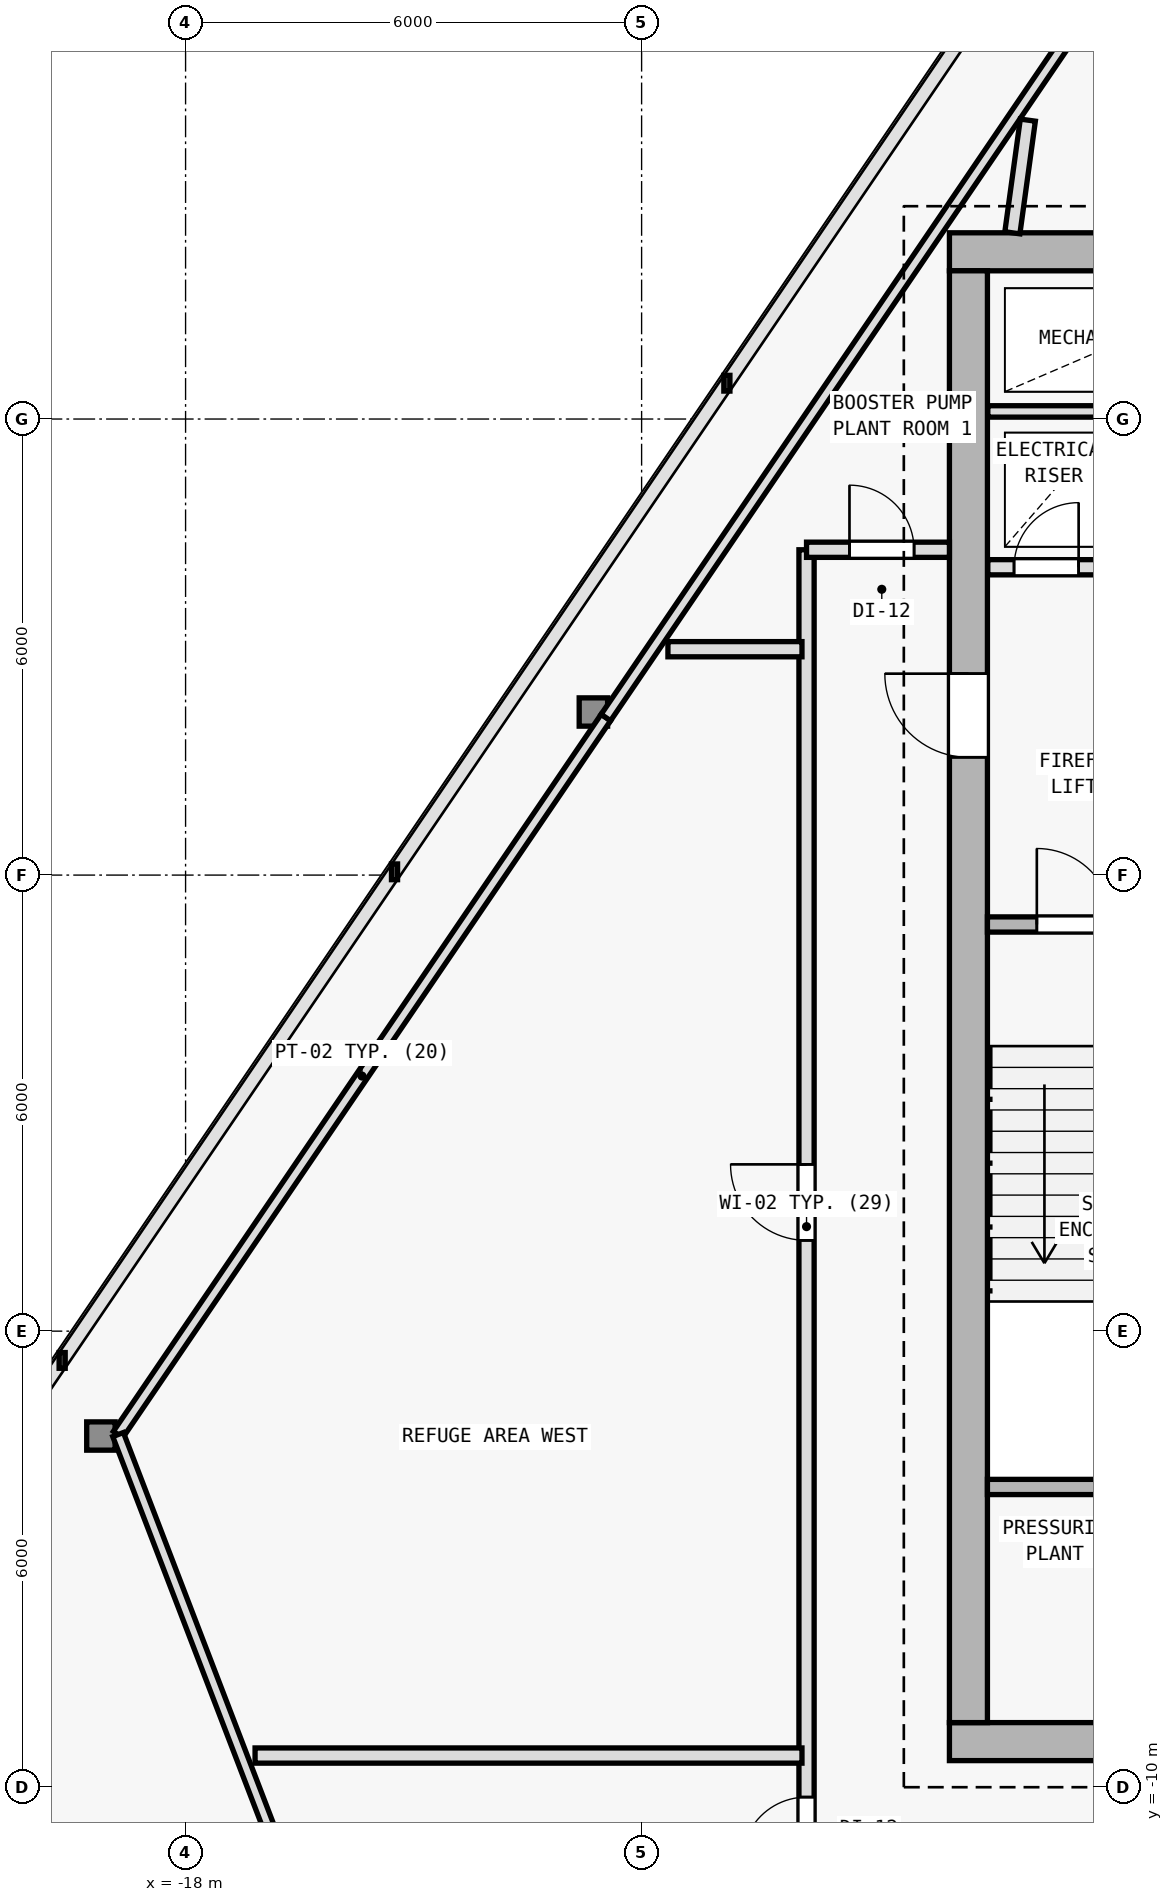
"""IFC4 building model, lengths in metres.
Left out: names, types, materials, properties, quantities, classifications, styles, units other than length and angle.
Written with IfcOpenShell. Run it as: python <this file> out.ifc"""

import sys

from ifc_helpers import new_model, si_unit, direction, frame, frame_2d, origin, origin_2d, place, context, subcontext, project, spatial, rectangle, i_section, extrude, element, fill, save


model = new_model("IFC4")
c1 = context("Model", 3, precision=1e-05, world=origin(), true_north=direction((0.0, 1.0)))
c2 = subcontext(c1, "Body", "Model", "MODEL_VIEW")
j1 = project(units=[si_unit("LENGTHUNIT", "METRE"), si_unit("PLANEANGLEUNIT", "RADIAN")], contexts=[c1])
p1 = place(None, origin())
s1 = spatial("IfcSite", under=j1, at=p1, CompositionType="ELEMENT")
p2 = place(p1, origin())
s2 = spatial("IfcBuilding", under=s1, at=p2, CompositionType="ELEMENT")
p3 = place(p2, frame((0.0, 0.0, 241.5)))
s3 = spatial("IfcBuildingStorey", under=s2, at=p3, CompositionType="ELEMENT", Elevation=241.5)
for number, where, z_axis, x_axis in (
    (1, (-7.7, -9.4, 0.0), (0.0, 0.0, 1.0), (1.0, 0.0, 0.0)),
    (2, (-7.7, 10.2, 0.0), (0.0, 0.0, 1.0), (1.0, 0.0, 0.0)),
    (3, (-7.7, 2.0, 0.0), (0.0, 0.0, 1.0), (1.0, 0.0, 0.0)),
):
    element("IfcColumn", number, at=place(p3, frame(where, z_axis=z_axis, x_axis=x_axis)), inside=s3, PredefinedType="COLUMN", context=c2, shape_type="SweptSolid", body=[
        extrude(i_section(OverallWidth=0.398, OverallDepth=0.387, WebThickness=0.013, FlangeThickness=0.022, FilletRadius=0.015, at=origin_2d()), origin(), (0.0, 0.0, 1.0), 4.8),
    ])
p4 = place(p3, frame((-12.634, 4.146, 0.006), z_axis=(0.013151707095, 0.007340487681, 0.999886568487), x_axis=(-0.487366159264, 0.873197702015, 0.0)))
e4 = element("IfcColumn", 4, at=p4, inside=s3, PredefinedType="COLUMN", context=c2, shape_type="SweptSolid", body=[
    extrude(i_section(OverallWidth=0.374, OverallDepth=0.372, WebThickness=0.012, FlangeThickness=0.02, FilletRadius=0.015, at=origin_2d()), origin(), (0.0, 0.0, 1.0), 4.789),
])
p5 = place(p3, frame((-19.114, -5.38, 0.006), z_axis=(0.019468495457, 0.016665439828, 0.999671566466), x_axis=(-0.65029991508, 0.759677576638, 0.0)))
e5 = element("IfcColumn", 5, at=p5, inside=s3, PredefinedType="COLUMN", context=c2, shape_type="SweptSolid", body=[
    extrude(i_section(OverallWidth=0.374, OverallDepth=0.372, WebThickness=0.012, FlangeThickness=0.02, FilletRadius=0.015, at=origin_2d()), origin(), (0.0, 0.0, 1.0), 4.79),
])
p6 = place(p3, frame((-7.95, -9.4, 0.0), z_axis=(0.0, 0.0, 1.0), x_axis=(1.0, 0.0, 0.0)))
e6 = element("IfcWall", 6, at=p6, inside=s3, PredefinedType="SHEAR", context=c2, shape_type="SweptSolid", body=[
    extrude(rectangle(XDim=15.9, YDim=0.5, at=frame_2d((7.95, 0.0))), origin(), (0.0, 0.0, 1.0), 4.5),
])
p7 = place(p6, frame((9.6, 0.0, 0.0)))
e7 = element("IfcOpeningElement", 7, at=p7, cuts=e6, PredefinedType="OPENING", context=c2, shape_type="SweptSolid", body=[
    extrude(rectangle(XDim=1.5, YDim=2.2, at=frame_2d((0.75, 1.1))), frame((0.0, 0.26, 0.0), z_axis=(0.0, -1.0, 0.0), x_axis=(1.0, 0.0, 0.0)), (0.0, 0.0, 1.0), 0.52),
])
p8 = place(p3, frame((7.95, 10.2, 0.0), z_axis=(0.0, 0.0, 1.0), x_axis=(-1.0, 0.0, 0.0)))
e8 = element("IfcWall", 8, at=p8, inside=s3, PredefinedType="SHEAR", context=c2, shape_type="SweptSolid", body=[
    extrude(rectangle(XDim=15.9, YDim=0.5, at=frame_2d((7.95, 0.0))), origin(), (0.0, 0.0, 1.0), 4.5),
])
p9 = place(p3, frame((-7.7, -9.15, 0.0), z_axis=(0.0, 0.0, 1.0), x_axis=(0.0, 1.0, 0.0)))
e9 = element("IfcWall", 9, at=p9, inside=s3, PredefinedType="SHEAR", context=c2, shape_type="SweptSolid", body=[
    extrude(rectangle(XDim=19.1, YDim=0.5, at=frame_2d((9.55, 0.0))), origin(), (0.0, 0.0, 1.0), 4.5),
])
p10 = place(p9, frame((12.7, 0.0, 0.0)))
e10 = element("IfcOpeningElement", 10, at=p10, cuts=e9, PredefinedType="OPENING", context=c2, shape_type="SweptSolid", body=[
    extrude(rectangle(XDim=1.1, YDim=2.15, at=frame_2d((0.55, 1.075))), frame((0.0, 0.26, 0.0), z_axis=(0.0, -1.0, 0.0), x_axis=(1.0, 0.0, 0.0)), (0.0, 0.0, 1.0), 0.52),
])
p11 = place(p3, frame((-7.45, 1.35, 0.0), z_axis=(0.0, 0.0, 1.0), x_axis=(1.0, 0.0, 0.0)))
e11 = element("IfcWall", 11, at=p11, inside=s3, PredefinedType="SOLIDWALL", context=c2, shape_type="SweptSolid", body=[
    extrude(rectangle(XDim=3.4, YDim=0.2, at=frame_2d((1.7, 0.0))), origin(), (0.0, 0.0, 1.0), 4.5),
])
p12 = place(p11, frame((0.65, 0.0, 0.0)))
e12 = element("IfcOpeningElement", 12, at=p12, cuts=e11, PredefinedType="OPENING", context=c2, shape_type="SweptSolid", body=[
    extrude(rectangle(XDim=1.0, YDim=2.15, at=frame_2d((0.5, 1.075))), frame((0.0, 0.11, 0.0), z_axis=(0.0, -1.0, 0.0), x_axis=(1.0, 0.0, 0.0)), (0.0, 0.0, 1.0), 0.22),
])
p13 = place(p3, frame((-7.445, 6.05, 0.0), z_axis=(0.0, 0.0, 1.0), x_axis=(1.0, 0.0, 0.0)))
e13 = element("IfcWall", 13, at=p13, inside=s3, PredefinedType="SOLIDWALL", context=c2, shape_type="SweptSolid", body=[
    extrude(rectangle(XDim=3.595, YDim=0.2, at=frame_2d((1.797, 0.0))), origin(), (0.0, 0.0, 1.0), 4.5),
])
p14 = place(p13, frame((0.345, 0.0, 0.0)))
e14 = element("IfcOpeningElement", 14, at=p14, cuts=e13, PredefinedType="OPENING", context=c2, shape_type="SweptSolid", body=[
    extrude(rectangle(XDim=0.85, YDim=2.1, at=frame_2d((0.425, 1.05))), frame((0.0, 0.11, 0.0), z_axis=(0.0, -1.0, 0.0), x_axis=(1.0, 0.0, 0.0)), (0.0, 0.0, 1.0), 0.22),
])
p15 = place(p13, frame((2.145, 0.0, 0.0)))
e15 = element("IfcOpeningElement", 15, at=p15, cuts=e13, PredefinedType="OPENING", context=c2, shape_type="SweptSolid", body=[
    extrude(rectangle(XDim=0.85, YDim=2.1, at=frame_2d((0.425, 1.05))), frame((0.0, 0.11, 0.0), z_axis=(0.0, -1.0, 0.0), x_axis=(1.0, 0.0, 0.0)), (0.0, 0.0, 1.0), 0.22),
])
p16 = place(p3, frame((-7.445, 8.1, 0.0), z_axis=(0.0, 0.0, 1.0), x_axis=(1.0, 0.0, 0.0)))
e16 = element("IfcWall", 16, at=p16, inside=s3, PredefinedType="PARTITIONING", context=c2, shape_type="SweptSolid", body=[
    extrude(rectangle(XDim=3.595, YDim=0.15, at=frame_2d((1.797, 0.0))), origin(), (0.0, 0.0, 1.0), 4.5),
])
p17 = place(p3, frame((-7.45, -6.05, 0.0), z_axis=(0.0, 0.0, 1.0), x_axis=(1.0, 0.0, 0.0)))
e17 = element("IfcWall", 17, at=p17, inside=s3, PredefinedType="SOLIDWALL", context=c2, shape_type="SweptSolid", body=[
    extrude(rectangle(XDim=3.4, YDim=0.2, at=frame_2d((1.7, 0.0))), origin(), (0.0, 0.0, 1.0), 4.5),
])
p18 = place(p3, frame((-18.888, -5.361, 0.0), z_axis=(0.0, 0.0, 1.0), x_axis=(0.562468038004, 0.826819028702, 0.0)))
e18 = element("IfcWall", 18, at=p18, inside=s3, PredefinedType="PARTITIONING", context=c2, shape_type="SweptSolid", body=[
    extrude(rectangle(XDim=11.409, YDim=0.15, at=frame_2d((5.705, 0.0))), origin(), (0.0, 0.0, 1.0), 4.025),
])
p19 = place(p3, frame((-12.47, 4.073, 0.0), z_axis=(0.0, 0.0, 1.0), x_axis=(0.562473312613, 0.826815440469, 0.0)))
e19 = element("IfcWall", 19, at=p19, inside=s3, PredefinedType="PARTITIONING", context=c2, shape_type="SweptSolid", body=[
    extrude(rectangle(XDim=11.409, YDim=0.15, at=frame_2d((5.705, 0.0))), origin(), (0.0, 0.0, 1.0), 3.925),
])
p20 = place(p3, frame((-15.925, -13.084, 0.0), z_axis=(0.0, 0.0, 1.0), x_axis=(-0.358205734872, 0.933642678708, 0.0)))
e20 = element("IfcWall", 20, at=p20, inside=s3, PredefinedType="PARTITIONING", context=c2, shape_type="SweptSolid", body=[
    extrude(rectangle(XDim=8.273, YDim=0.15, at=frame_2d((4.136, 0.0))), origin(), (0.0, 0.0, 1.0), 4.025),
])
p21 = place(p3, frame((-9.83, -11.53, 0.0), z_axis=(0.0, 0.0, 1.0), x_axis=(0.0, 1.0, 0.0)))
e21 = element("IfcWall", 21, at=p21, inside=s3, PredefinedType="SOLIDWALL", context=c2, shape_type="SweptSolid", body=[
    extrude(rectangle(XDim=17.81, YDim=0.2, at=frame_2d((8.905, 0.0))), origin(), (0.0, 0.0, 1.0), 3.925),
])
p22 = place(p21, frame((8.724, 0.0, 0.0)))
e22 = element("IfcOpeningElement", 22, at=p22, cuts=e21, PredefinedType="OPENING", context=c2, shape_type="SweptSolid", body=[
    extrude(rectangle(XDim=1.0, YDim=2.15, at=frame_2d((0.5, 1.075))), frame((0.0, 0.11, 0.0), z_axis=(0.0, -1.0, 0.0), x_axis=(1.0, 0.0, 0.0)), (0.0, 0.0, 1.0), 0.22),
])
p23 = place(p21, frame((0.55, 0.0, 0.0)))
e23 = element("IfcOpeningElement", 23, at=p23, cuts=e21, PredefinedType="OPENING", context=c2, shape_type="SweptSolid", body=[
    extrude(rectangle(XDim=0.85, YDim=2.1, at=frame_2d((0.425, 1.05))), frame((0.0, 0.11, 0.0), z_axis=(0.0, -1.0, 0.0), x_axis=(1.0, 0.0, 0.0)), (0.0, 0.0, 1.0), 0.22),
])
p24 = place(p3, frame((-9.83, 6.28, 0.0), z_axis=(0.0, 0.0, 1.0), x_axis=(1.0, 0.0, 0.0)))
e24 = element("IfcWall", 24, at=p24, inside=s3, PredefinedType="SOLIDWALL", context=c2, shape_type="SweptSolid", body=[
    extrude(rectangle(XDim=1.88, YDim=0.2, at=frame_2d((0.94, 0.0))), origin(), (0.0, 0.0, 1.0), 3.925),
])
p25 = place(p24, frame((0.565, 0.0, 0.0)))
e25 = element("IfcOpeningElement", 25, at=p25, cuts=e24, PredefinedType="OPENING", context=c2, shape_type="SweptSolid", body=[
    extrude(rectangle(XDim=0.85, YDim=2.1, at=frame_2d((0.425, 1.05))), frame((0.0, 0.11, 0.0), z_axis=(0.0, -1.0, 0.0), x_axis=(1.0, 0.0, 0.0)), (0.0, 0.0, 1.0), 0.22),
])
p26 = place(p3, frame((-9.89, -9.583, 0.0), z_axis=(0.0, 0.0, 1.0), x_axis=(-1.0, 0.0, 0.0)))
e26 = element("IfcWall", 26, at=p26, inside=s3, PredefinedType="SOLIDWALL", context=c2, shape_type="SweptSolid", body=[
    extrude(rectangle(XDim=7.196, YDim=0.2, at=frame_2d((3.598, 0.0))), origin(), (0.0, 0.0, 1.0), 4.125),
])
p27 = place(p3, frame((-7.122, 10.45, 0.0), z_axis=(0.0, 0.0, 1.0), x_axis=(0.135914078288, 0.990720628292, 0.0)))
e27 = element("IfcWall", 27, at=p27, inside=s3, PredefinedType="SOLIDWALL", context=c2, shape_type="SweptSolid", body=[
    extrude(rectangle(XDim=1.496, YDim=0.2, at=frame_2d((0.748, 0.0))), origin(), (0.0, 0.0, 1.0), 3.925),
])
p28 = place(p3, frame((-9.89, 4.972, 0.0), z_axis=(0.0, 0.0, 1.0), x_axis=(-1.0, 0.0, 0.0)))
e28 = element("IfcWall", 28, at=p28, inside=s3, PredefinedType="SOLIDWALL", context=c2, shape_type="SweptSolid", body=[
    extrude(rectangle(XDim=1.764, YDim=0.2, at=frame_2d((0.882, 0.0))), origin(), (0.0, 0.0, 1.0), 4.5),
])
p29 = place(p10, origin())
e29 = element("IfcDoor", 29, at=p29, inside=s3, OperationType="SINGLE_SWING_RIGHT", PredefinedType="DOOR", context=c2, shape_type="SweptSolid", body=[
    extrude(rectangle(XDim=1.1, YDim=2.15, at=frame_2d((0.55, 1.075))), frame((0.0, 0.025, 0.0), z_axis=(0.0, -1.0, 0.0), x_axis=(1.0, 0.0, 0.0)), (0.0, 0.0, 1.0), 0.05),
])
fill(e10, e29)
p30 = place(p12, origin())
e30 = element("IfcDoor", 30, at=p30, inside=s3, OperationType="SINGLE_SWING_LEFT", PredefinedType="DOOR", context=c2, shape_type="SweptSolid", body=[
    extrude(rectangle(XDim=1.0, YDim=2.15, at=frame_2d((0.5, 1.075))), frame((0.0, 0.025, 0.0), z_axis=(0.0, -1.0, 0.0), x_axis=(1.0, 0.0, 0.0)), (0.0, 0.0, 1.0), 0.05),
])
fill(e12, e30)
p31 = place(p14, origin())
e31 = element("IfcDoor", 31, at=p31, inside=s3, OperationType="SINGLE_SWING_RIGHT", PredefinedType="DOOR", context=c2, shape_type="SweptSolid", body=[
    extrude(rectangle(XDim=0.85, YDim=2.1, at=frame_2d((0.425, 1.05))), frame((0.0, 0.025, 0.0), z_axis=(0.0, -1.0, 0.0), x_axis=(1.0, 0.0, 0.0)), (0.0, 0.0, 1.0), 0.05),
])
fill(e14, e31)
p32 = place(p22, origin())
e32 = element("IfcDoor", 32, at=p32, inside=s3, OperationType="SINGLE_SWING_RIGHT", PredefinedType="DOOR", context=c2, shape_type="SweptSolid", body=[
    extrude(rectangle(XDim=1.0, YDim=2.15, at=frame_2d((0.5, 1.075))), frame((0.0, 0.025, 0.0), z_axis=(0.0, -1.0, 0.0), x_axis=(1.0, 0.0, 0.0)), (0.0, 0.0, 1.0), 0.05),
])
fill(e22, e32)
p33 = place(p23, origin())
e33 = element("IfcDoor", 33, at=p33, inside=s3, OperationType="SINGLE_SWING_LEFT", PredefinedType="DOOR", context=c2, shape_type="SweptSolid", body=[
    extrude(rectangle(XDim=0.85, YDim=2.1, at=frame_2d((0.425, 1.05))), frame((0.0, 0.025, 0.0), z_axis=(0.0, -1.0, 0.0), x_axis=(1.0, 0.0, 0.0)), (0.0, 0.0, 1.0), 0.05),
])
fill(e23, e33)
p34 = place(p25, origin())
e34 = element("IfcDoor", 34, at=p34, inside=s3, OperationType="SINGLE_SWING_LEFT", PredefinedType="DOOR", context=c2, shape_type="SweptSolid", body=[
    extrude(rectangle(XDim=0.85, YDim=2.1, at=frame_2d((0.425, 1.05))), frame((0.0, 0.025, 0.0), z_axis=(0.0, -1.0, 0.0), x_axis=(1.0, 0.0, 0.0)), (0.0, 0.0, 1.0), 0.05),
])
fill(e25, e34)
save(model, sys.argv[1])
